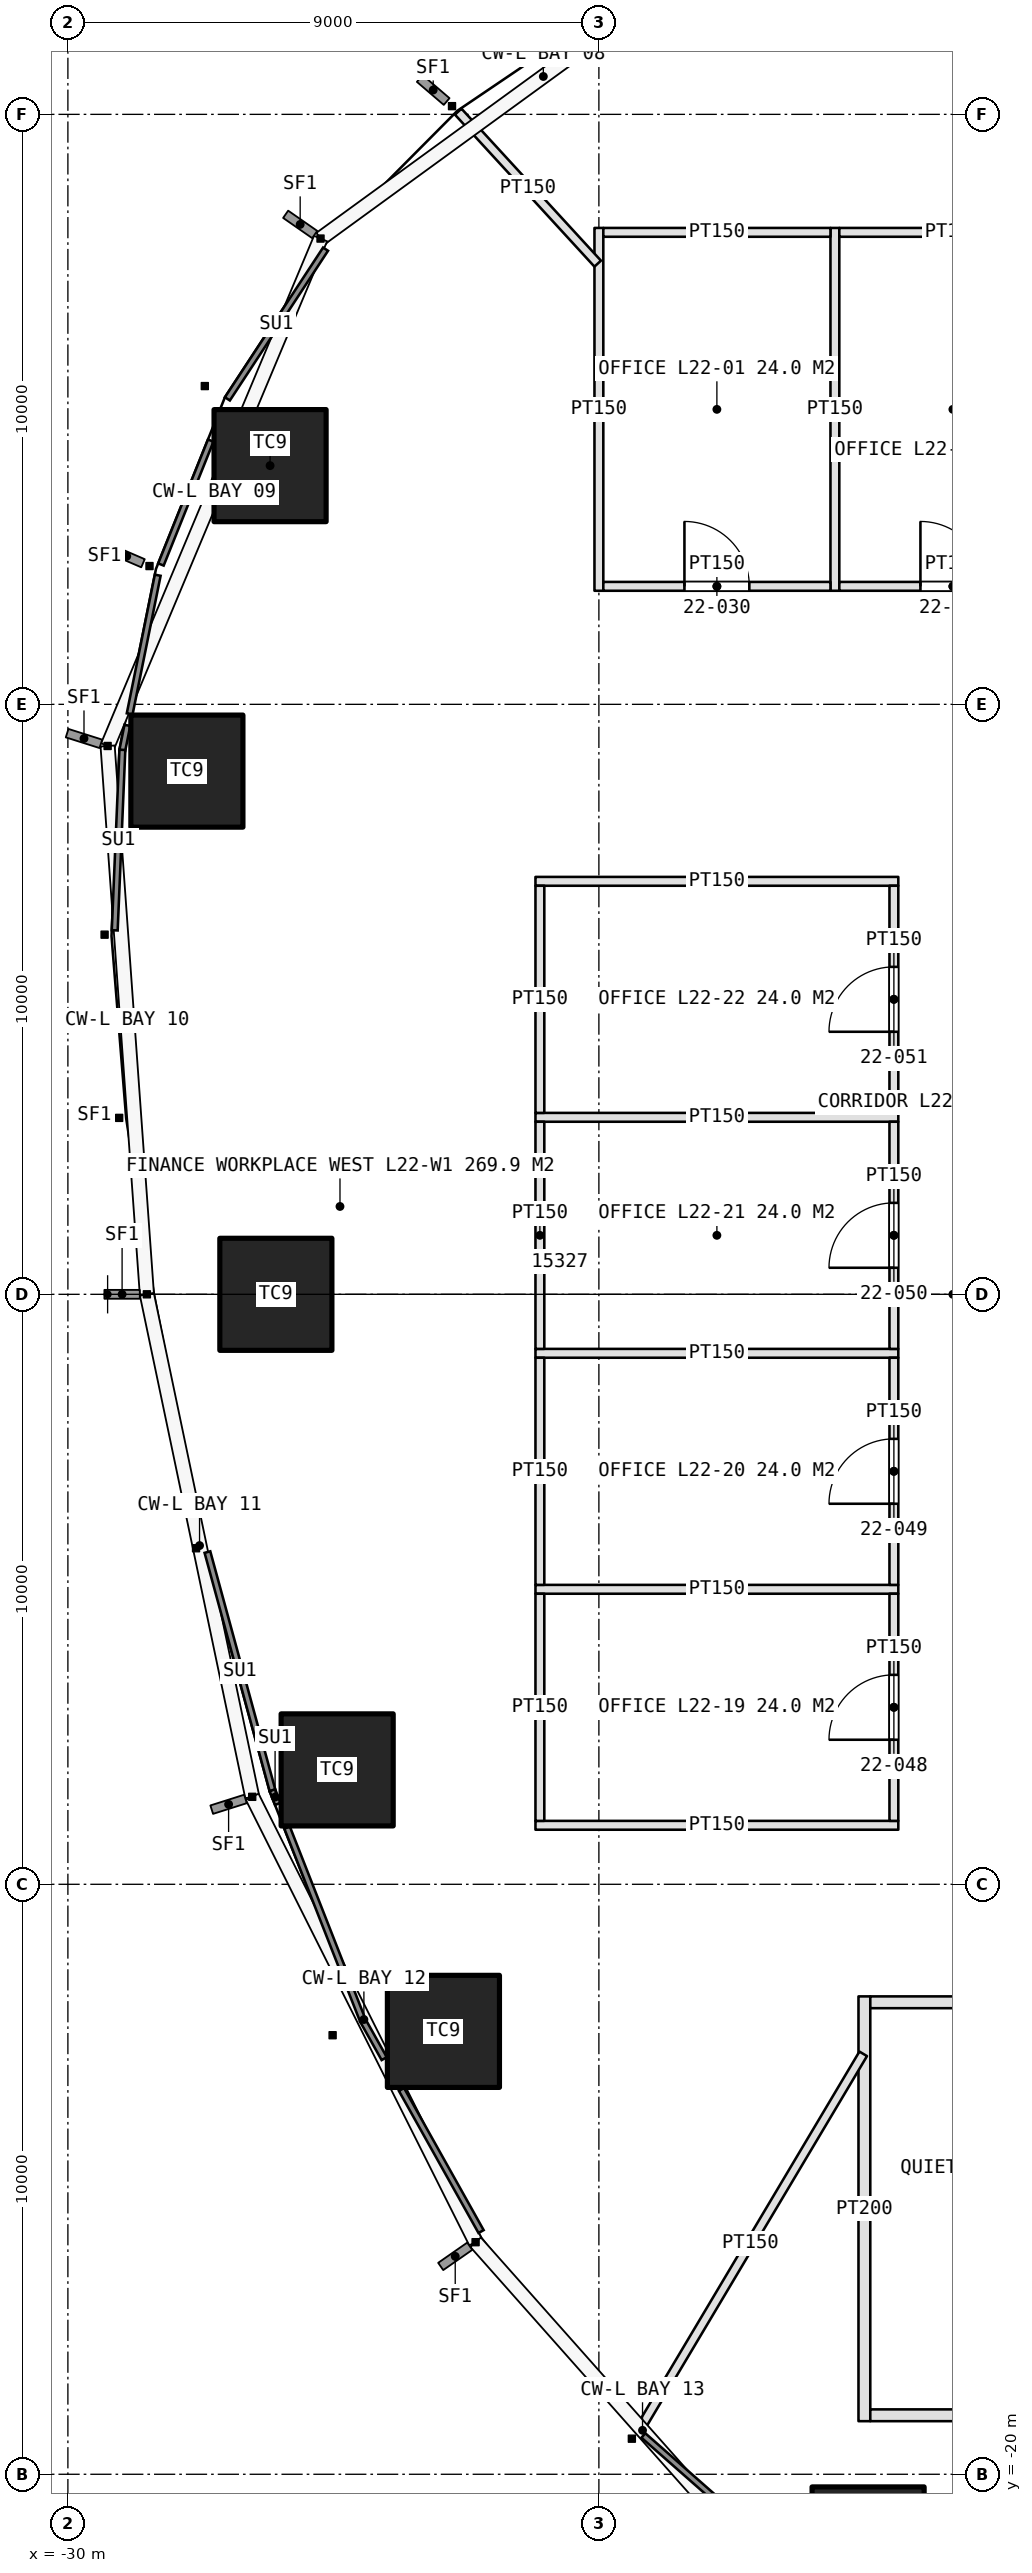
"""IFC4 building model, lengths in metres.
Left out: names, types, materials, properties, quantities, classifications, styles, units other than length and angle.
Written with IfcOpenShell. Run it as: python <this file> out.ifc"""

import sys

from ifc_helpers import new_model, si_unit, direction, frame, frame_2d, origin, origin_2d, place, context, subcontext, project, spatial, rectangle, extrude, element, fill, save


model = new_model("IFC4")
c1 = context("Model", 3, precision=1e-05, world=origin(), true_north=direction((0.0, 1.0)))
c2 = subcontext(c1, "Body", "Model", "MODEL_VIEW")
j1 = project(units=[si_unit("LENGTHUNIT", "METRE"), si_unit("PLANEANGLEUNIT", "RADIAN")], contexts=[c1])
p1 = place(None, origin())
s1 = spatial("IfcSite", under=j1, at=p1, CompositionType="ELEMENT")
p2 = place(p1, origin())
s2 = spatial("IfcBuilding", under=s1, at=p2, CompositionType="ELEMENT")
p3 = place(p2, frame((0.0, 0.0, 109.2)))
s3 = spatial("IfcBuildingStorey", under=s2, at=p3, CompositionType="ELEMENT", Elevation=109.2)
for number, where, z_axis, x_axis in (
    (1, (-26.573, 14.046, 0.0), (0.0, 0.0, 1.0), (1.0, 0.0, 0.0)),
    (2, (-27.983, 8.868, 0.0), (0.0, 0.0, 1.0), (1.0, 0.0, 0.0)),
    (3, (-26.475, 0.0, 0.0), (0.0, 0.0, 1.0), (1.0, 0.0, 0.0)),
    (4, (-25.436, -8.061, 0.0), (0.0, 0.0, 1.0), (1.0, 0.0, 0.0)),
    (5, (-23.635, -12.493, 0.0), (0.0, 0.0, 1.0), (1.0, 0.0, 0.0)),
    (6, (-16.437, -21.164, 0.0), (0.0, 0.0, 1.0), (1.0, 0.0, 0.0)),
):
    element("IfcColumn", number, at=place(p3, frame(where, z_axis=z_axis, x_axis=x_axis)), inside=s3, PredefinedType="COLUMN", context=c2, shape_type="SweptSolid", body=[
        extrude(rectangle(XDim=1.9, YDim=1.9, at=origin_2d()), origin(), (0.0, 0.0, 1.0), 4.2),
    ])
for number, where, z_axis, x_axis in (
    (7, (-21.0, 11.925, 0.0), (0.0, 0.0, 1.0), (0.0, 1.0, 0.0)),
    (8, (-17.0, 11.925, 0.0), (0.0, 0.0, 1.0), (0.0, 1.0, 0.0)),
):
    element("IfcWall", number, at=place(p3, frame(where, z_axis=z_axis, x_axis=x_axis)), inside=s3, PredefinedType="PARTITIONING", context=c2, shape_type="SweptSolid", body=[
        extrude(rectangle(XDim=6.15, YDim=0.15, at=frame_2d((3.075, 0.0))), origin(), (0.0, 0.0, 1.0), 3.0),
    ])
p4 = place(p3, frame((-20.925, 12.0, 0.0), z_axis=(0.0, 0.0, 1.0), x_axis=(1.0, 0.0, 0.0)))
e9 = element("IfcWall", 9, at=p4, inside=s3, PredefinedType="PARTITIONING", context=c2, shape_type="SweptSolid", body=[
    extrude(rectangle(XDim=3.85, YDim=0.15, at=frame_2d((1.925, 0.0))), origin(), (0.0, 0.0, 1.0), 3.0),
])
p5 = place(p4, frame((1.375, 0.0, 0.0)))
e10 = element("IfcOpeningElement", 10, at=p5, cuts=e9, PredefinedType="OPENING", context=c2, shape_type="SweptSolid", body=[
    extrude(rectangle(XDim=1.1, YDim=2.3, at=frame_2d((0.55, 1.15))), frame((0.0, 0.085, 0.0), z_axis=(0.0, -1.0, 0.0), x_axis=(1.0, 0.0, 0.0)), (0.0, 0.0, 1.0), 0.17),
])
p6 = place(p3, frame((-20.925, 18.0, 0.0), z_axis=(0.0, 0.0, 1.0), x_axis=(1.0, 0.0, 0.0)))
e11 = element("IfcWall", 11, at=p6, inside=s3, PredefinedType="PARTITIONING", context=c2, shape_type="SweptSolid", body=[
    extrude(rectangle(XDim=3.85, YDim=0.15, at=frame_2d((1.925, 0.0))), origin(), (0.0, 0.0, 1.0), 3.0),
])
p7 = place(p3, frame((-16.925, 12.0, 0.0), z_axis=(0.0, 0.0, 1.0), x_axis=(1.0, 0.0, 0.0)))
e12 = element("IfcWall", 12, at=p7, inside=s3, PredefinedType="PARTITIONING", context=c2, shape_type="SweptSolid", body=[
    extrude(rectangle(XDim=3.85, YDim=0.15, at=frame_2d((1.925, 0.0))), origin(), (0.0, 0.0, 1.0), 3.0),
])
p8 = place(p7, frame((1.375, 0.0, 0.0)))
e13 = element("IfcOpeningElement", 13, at=p8, cuts=e12, PredefinedType="OPENING", context=c2, shape_type="SweptSolid", body=[
    extrude(rectangle(XDim=1.1, YDim=2.3, at=frame_2d((0.55, 1.15))), frame((0.0, 0.085, 0.0), z_axis=(0.0, -1.0, 0.0), x_axis=(1.0, 0.0, 0.0)), (0.0, 0.0, 1.0), 0.17),
])
p9 = place(p3, frame((-16.925, 18.0, 0.0), z_axis=(0.0, 0.0, 1.0), x_axis=(1.0, 0.0, 0.0)))
e14 = element("IfcWall", 14, at=p9, inside=s3, PredefinedType="PARTITIONING", context=c2, shape_type="SweptSolid", body=[
    extrude(rectangle(XDim=3.85, YDim=0.15, at=frame_2d((1.925, 0.0))), origin(), (0.0, 0.0, 1.0), 3.0),
])
p10 = place(p3, frame((-16.5, -11.9, 0.0), z_axis=(0.0, 0.0, 1.0), x_axis=(0.0, -1.0, 0.0)))
e15 = element("IfcWall", 15, at=p10, inside=s3, PredefinedType="PARTITIONING", context=c2, shape_type="SweptSolid", body=[
    extrude(rectangle(XDim=7.2, YDim=0.2, at=frame_2d((3.6, 0.0))), origin(), (0.0, 0.0, 1.0), 3.0),
])
p11 = place(p3, frame((-16.4, -12.0, 0.0), z_axis=(0.0, 0.0, 1.0), x_axis=(1.0, 0.0, 0.0)))
e16 = element("IfcWall", 16, at=p11, inside=s3, PredefinedType="PARTITIONING", context=c2, shape_type="SweptSolid", body=[
    extrude(rectangle(XDim=5.8, YDim=0.2, at=frame_2d((2.9, 0.0))), origin(), (0.0, 0.0, 1.0), 3.0),
])
p12 = place(p11, frame((2.35, 0.0, 0.0)))
e17 = element("IfcOpeningElement", 17, at=p12, cuts=e16, PredefinedType="OPENING", context=c2, shape_type="SweptSolid", body=[
    extrude(rectangle(XDim=1.1, YDim=2.3, at=frame_2d((0.55, 1.15))), frame((0.0, 0.11, 0.0), z_axis=(0.0, -1.0, 0.0), x_axis=(1.0, 0.0, 0.0)), (0.0, 0.0, 1.0), 0.22),
])
p13 = place(p3, frame((-16.4, -19.0, 0.0), z_axis=(0.0, 0.0, 1.0), x_axis=(1.0, 0.0, 0.0)))
e18 = element("IfcWall", 18, at=p13, inside=s3, PredefinedType="PARTITIONING", context=c2, shape_type="SweptSolid", body=[
    extrude(rectangle(XDim=5.8, YDim=0.2, at=frame_2d((2.9, 0.0))), origin(), (0.0, 0.0, 1.0), 3.0),
])
for number, where, z_axis, x_axis in (
    (19, (-15.925, -9.0, 0.0), (0.0, 0.0, 1.0), (-1.0, 0.0, 0.0)),
    (20, (-15.925, -5.0, 0.0), (0.0, 0.0, 1.0), (-1.0, 0.0, 0.0)),
    (21, (-15.925, -1.0, 0.0), (0.0, 0.0, 1.0), (-1.0, 0.0, 0.0)),
    (22, (-15.925, 3.0, 0.0), (0.0, 0.0, 1.0), (-1.0, 0.0, 0.0)),
    (23, (-15.925, 7.0, 0.0), (0.0, 0.0, 1.0), (-1.0, 0.0, 0.0)),
):
    element("IfcWall", number, at=place(p3, frame(where, z_axis=z_axis, x_axis=x_axis)), inside=s3, PredefinedType="PARTITIONING", context=c2, shape_type="SweptSolid", body=[
        extrude(rectangle(XDim=6.15, YDim=0.15, at=frame_2d((3.075, 0.0))), origin(), (0.0, 0.0, 1.0), 3.0),
    ])
p14 = place(p3, frame((-16.0, -8.925, 0.0), z_axis=(0.0, 0.0, 1.0), x_axis=(0.0, 1.0, 0.0)))
e24 = element("IfcWall", 24, at=p14, inside=s3, PredefinedType="PARTITIONING", context=c2, shape_type="SweptSolid", body=[
    extrude(rectangle(XDim=3.85, YDim=0.15, at=frame_2d((1.925, 0.0))), origin(), (0.0, 0.0, 1.0), 3.0),
])
p15 = place(p14, frame((1.375, 0.0, 0.0)))
e25 = element("IfcOpeningElement", 25, at=p15, cuts=e24, PredefinedType="OPENING", context=c2, shape_type="SweptSolid", body=[
    extrude(rectangle(XDim=1.1, YDim=2.3, at=frame_2d((0.55, 1.15))), frame((0.0, 0.085, 0.0), z_axis=(0.0, -1.0, 0.0), x_axis=(1.0, 0.0, 0.0)), (0.0, 0.0, 1.0), 0.17),
])
p16 = place(p3, frame((-22.0, -8.925, 0.0), z_axis=(0.0, 0.0, 1.0), x_axis=(0.0, 1.0, 0.0)))
e26 = element("IfcWall", 26, at=p16, inside=s3, PredefinedType="PARTITIONING", context=c2, shape_type="SweptSolid", body=[
    extrude(rectangle(XDim=3.85, YDim=0.15, at=frame_2d((1.925, 0.0))), origin(), (0.0, 0.0, 1.0), 3.0),
])
p17 = place(p3, frame((-16.0, -4.925, 0.0), z_axis=(0.0, 0.0, 1.0), x_axis=(0.0, 1.0, 0.0)))
e27 = element("IfcWall", 27, at=p17, inside=s3, PredefinedType="PARTITIONING", context=c2, shape_type="SweptSolid", body=[
    extrude(rectangle(XDim=3.85, YDim=0.15, at=frame_2d((1.925, 0.0))), origin(), (0.0, 0.0, 1.0), 3.0),
])
p18 = place(p17, frame((1.375, 0.0, 0.0)))
e28 = element("IfcOpeningElement", 28, at=p18, cuts=e27, PredefinedType="OPENING", context=c2, shape_type="SweptSolid", body=[
    extrude(rectangle(XDim=1.1, YDim=2.3, at=frame_2d((0.55, 1.15))), frame((0.0, 0.085, 0.0), z_axis=(0.0, -1.0, 0.0), x_axis=(1.0, 0.0, 0.0)), (0.0, 0.0, 1.0), 0.17),
])
p19 = place(p3, frame((-22.0, -4.925, 0.0), z_axis=(0.0, 0.0, 1.0), x_axis=(0.0, 1.0, 0.0)))
e29 = element("IfcWall", 29, at=p19, inside=s3, PredefinedType="PARTITIONING", context=c2, shape_type="SweptSolid", body=[
    extrude(rectangle(XDim=3.85, YDim=0.15, at=frame_2d((1.925, 0.0))), origin(), (0.0, 0.0, 1.0), 3.0),
])
p20 = place(p3, frame((-16.0, -0.925, 0.0), z_axis=(0.0, 0.0, 1.0), x_axis=(0.0, 1.0, 0.0)))
e30 = element("IfcWall", 30, at=p20, inside=s3, PredefinedType="PARTITIONING", context=c2, shape_type="SweptSolid", body=[
    extrude(rectangle(XDim=3.85, YDim=0.15, at=frame_2d((1.925, 0.0))), origin(), (0.0, 0.0, 1.0), 3.0),
])
p21 = place(p20, frame((1.375, 0.0, 0.0)))
e31 = element("IfcOpeningElement", 31, at=p21, cuts=e30, PredefinedType="OPENING", context=c2, shape_type="SweptSolid", body=[
    extrude(rectangle(XDim=1.1, YDim=2.3, at=frame_2d((0.55, 1.15))), frame((0.0, 0.085, 0.0), z_axis=(0.0, -1.0, 0.0), x_axis=(1.0, 0.0, 0.0)), (0.0, 0.0, 1.0), 0.17),
])
p22 = place(p3, frame((-22.0, -0.925, 0.0), z_axis=(0.0, 0.0, 1.0), x_axis=(0.0, 1.0, 0.0)))
e32 = element("IfcWall", 32, at=p22, inside=s3, PredefinedType="PARTITIONING", context=c2, shape_type="SweptSolid", body=[
    extrude(rectangle(XDim=3.85, YDim=0.15, at=frame_2d((1.925, 0.0))), origin(), (0.0, 0.0, 1.0), 3.0),
])
p23 = place(p3, frame((-16.0, 3.075, 0.0), z_axis=(0.0, 0.0, 1.0), x_axis=(0.0, 1.0, 0.0)))
e33 = element("IfcWall", 33, at=p23, inside=s3, PredefinedType="PARTITIONING", context=c2, shape_type="SweptSolid", body=[
    extrude(rectangle(XDim=3.85, YDim=0.15, at=frame_2d((1.925, 0.0))), origin(), (0.0, 0.0, 1.0), 3.0),
])
p24 = place(p23, frame((1.375, 0.0, 0.0)))
e34 = element("IfcOpeningElement", 34, at=p24, cuts=e33, PredefinedType="OPENING", context=c2, shape_type="SweptSolid", body=[
    extrude(rectangle(XDim=1.1, YDim=2.3, at=frame_2d((0.55, 1.15))), frame((0.0, 0.085, 0.0), z_axis=(0.0, -1.0, 0.0), x_axis=(1.0, 0.0, 0.0)), (0.0, 0.0, 1.0), 0.17),
])
p25 = place(p3, frame((-22.0, 3.075, 0.0), z_axis=(0.0, 0.0, 1.0), x_axis=(0.0, 1.0, 0.0)))
e35 = element("IfcWall", 35, at=p25, inside=s3, PredefinedType="PARTITIONING", context=c2, shape_type="SweptSolid", body=[
    extrude(rectangle(XDim=3.85, YDim=0.15, at=frame_2d((1.925, 0.0))), origin(), (0.0, 0.0, 1.0), 3.0),
])
p26 = place(p3, frame((-16.52, -12.874, 0.0), z_axis=(0.0, 0.0, 1.0), x_axis=(-0.511514296511, -0.85927476657, 0.0)))
e36 = element("IfcWall", 36, at=p26, inside=s3, PredefinedType="PARTITIONING", context=c2, shape_type="SweptSolid", body=[
    extrude(rectangle(XDim=7.474, YDim=0.15, at=frame_2d((3.737, 0.0))), origin(), (0.0, 0.0, 1.0), 3.0),
])
p27 = place(p3, frame((-21.02, 17.47, 0.0), z_axis=(0.0, 0.0, 1.0), x_axis=(-0.67615762792, 0.736756989927, 0.0)))
e37 = element("IfcWall", 37, at=p27, inside=s3, PredefinedType="PARTITIONING", context=c2, shape_type="SweptSolid", body=[
    extrude(rectangle(XDim=3.497, YDim=0.15, at=frame_2d((1.749, 0.0))), origin(), (0.0, 0.0, 1.0), 3.0),
])
p28 = place(p5, origin())
e38 = element("IfcDoor", 38, at=p28, inside=s3, OperationType="SINGLE_SWING_LEFT", PredefinedType="DOOR", context=c2, shape_type="SweptSolid", body=[
    extrude(rectangle(XDim=1.1, YDim=2.3, at=frame_2d((0.55, 1.15))), frame((0.0, 0.025, 0.0), z_axis=(0.0, -1.0, 0.0), x_axis=(1.0, 0.0, 0.0)), (0.0, 0.0, 1.0), 0.05),
])
fill(e10, e38)
p29 = place(p8, origin())
e39 = element("IfcDoor", 39, at=p29, inside=s3, OperationType="SINGLE_SWING_LEFT", PredefinedType="DOOR", context=c2, shape_type="SweptSolid", body=[
    extrude(rectangle(XDim=1.1, YDim=2.3, at=frame_2d((0.55, 1.15))), frame((0.0, 0.025, 0.0), z_axis=(0.0, -1.0, 0.0), x_axis=(1.0, 0.0, 0.0)), (0.0, 0.0, 1.0), 0.05),
])
fill(e13, e39)
p30 = place(p15, origin())
e40 = element("IfcDoor", 40, at=p30, inside=s3, OperationType="SINGLE_SWING_LEFT", PredefinedType="DOOR", context=c2, shape_type="SweptSolid", body=[
    extrude(rectangle(XDim=1.1, YDim=2.3, at=frame_2d((0.55, 1.15))), frame((0.0, 0.025, 0.0), z_axis=(0.0, -1.0, 0.0), x_axis=(1.0, 0.0, 0.0)), (0.0, 0.0, 1.0), 0.05),
])
fill(e25, e40)
p31 = place(p18, origin())
e41 = element("IfcDoor", 41, at=p31, inside=s3, OperationType="SINGLE_SWING_LEFT", PredefinedType="DOOR", context=c2, shape_type="SweptSolid", body=[
    extrude(rectangle(XDim=1.1, YDim=2.3, at=frame_2d((0.55, 1.15))), frame((0.0, 0.025, 0.0), z_axis=(0.0, -1.0, 0.0), x_axis=(1.0, 0.0, 0.0)), (0.0, 0.0, 1.0), 0.05),
])
fill(e28, e41)
p32 = place(p21, origin())
e42 = element("IfcDoor", 42, at=p32, inside=s3, OperationType="SINGLE_SWING_LEFT", PredefinedType="DOOR", context=c2, shape_type="SweptSolid", body=[
    extrude(rectangle(XDim=1.1, YDim=2.3, at=frame_2d((0.55, 1.15))), frame((0.0, 0.025, 0.0), z_axis=(0.0, -1.0, 0.0), x_axis=(1.0, 0.0, 0.0)), (0.0, 0.0, 1.0), 0.05),
])
fill(e31, e42)
p33 = place(p24, origin())
e43 = element("IfcDoor", 43, at=p33, inside=s3, OperationType="SINGLE_SWING_LEFT", PredefinedType="DOOR", context=c2, shape_type="SweptSolid", body=[
    extrude(rectangle(XDim=1.1, YDim=2.3, at=frame_2d((0.55, 1.15))), frame((0.0, 0.025, 0.0), z_axis=(0.0, -1.0, 0.0), x_axis=(1.0, 0.0, 0.0)), (0.0, 0.0, 1.0), 0.05),
])
fill(e34, e43)
save(model, sys.argv[1])
